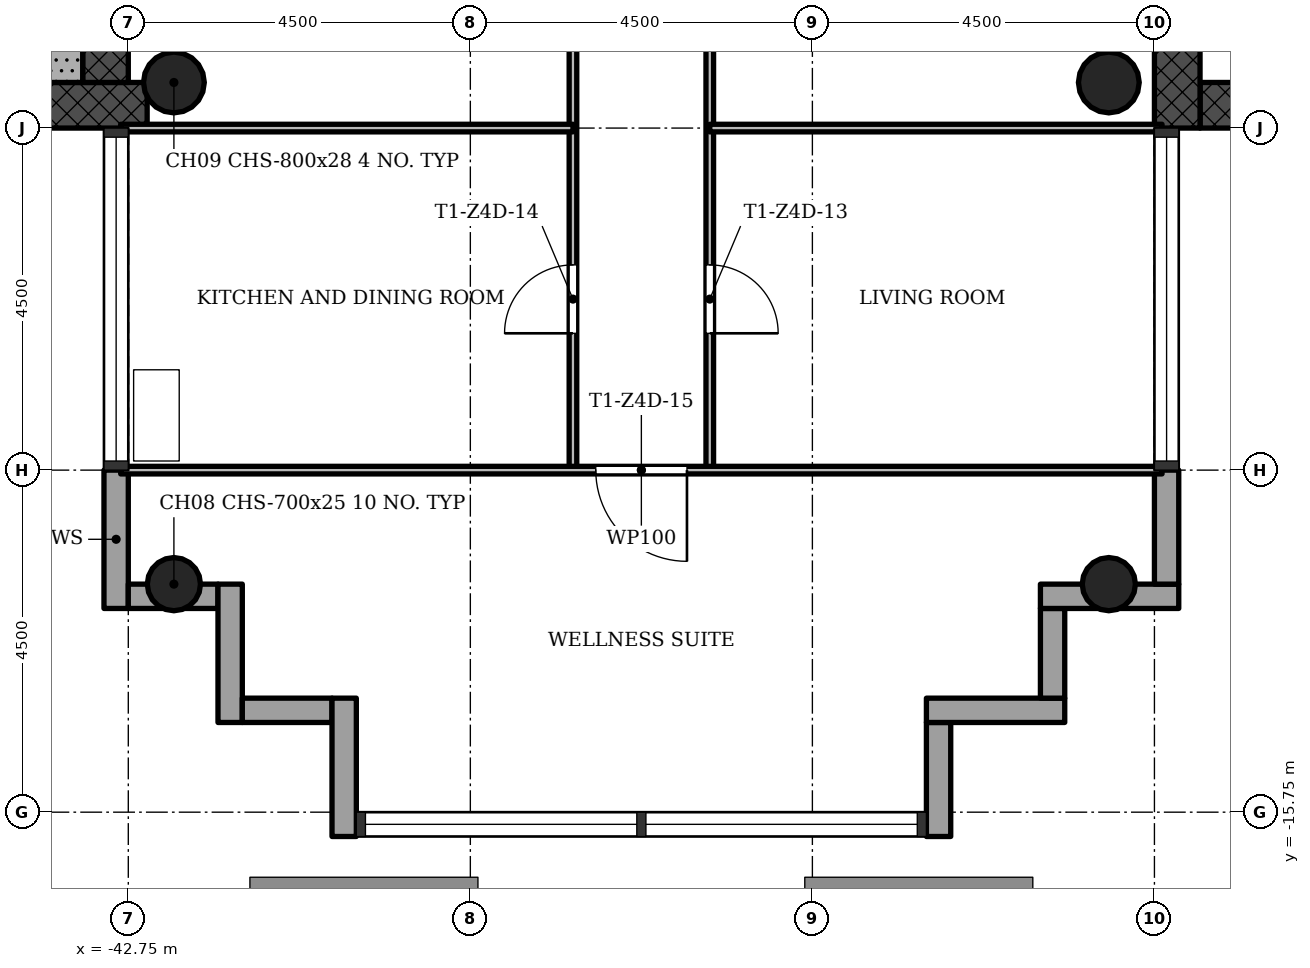
"""IFC4 building model, lengths in metres.
Left out: names, types, materials, properties, quantities, classifications, styles, units other than length and angle.
Written with IfcOpenShell. Run it as: python <this file> out.ifc"""

import sys

from ifc_helpers import new_model, si_unit, direction, frame, frame_2d, origin, origin_2d, place, context, subcontext, project, spatial, rectangle, hollow_circle, extrude, element, fill, save


model = new_model("IFC4")
c1 = context("Model", 3, precision=1e-05, world=origin(), true_north=direction((0.0, 1.0)))
c2 = subcontext(c1, "Body", "Model", "MODEL_VIEW")
j1 = project(units=[si_unit("LENGTHUNIT", "METRE"), si_unit("PLANEANGLEUNIT", "RADIAN")], contexts=[c1])
p1 = place(None, origin())
s1 = spatial("IfcSite", under=j1, at=p1, CompositionType="ELEMENT")
p2 = place(p1, origin())
s2 = spatial("IfcBuilding", under=s1, at=p2, CompositionType="ELEMENT")
p3 = place(p2, frame((0.0, 0.0, 196.0)))
s3 = spatial("IfcBuildingStorey", under=s2, at=p3, CompositionType="ELEMENT", Elevation=196.0)
p4 = place(p3, frame((-28.65, -6.45, 0.0), z_axis=(0.0, 0.0, 1.0), x_axis=(1.0, 0.0, 0.0)))
e1 = element("IfcWall", 1, at=p4, inside=s3, PredefinedType="SHEAR", context=c2, shape_type="SweptSolid", body=[
    extrude(rectangle(XDim=8.4, YDim=0.6, at=frame_2d((4.2, 0.0))), origin(), (0.0, 0.0, 1.0), 3.4),
])
p5 = place(p3, frame((-28.95, 6.15, 0.0), z_axis=(0.0, 0.0, 1.0), x_axis=(0.0, -1.0, 0.0)))
e2 = element("IfcWall", 2, at=p5, inside=s3, PredefinedType="SHEAR", context=c2, shape_type="SweptSolid", body=[
    extrude(rectangle(XDim=12.9, YDim=0.6, at=frame_2d((6.45, 0.0))), origin(), (0.0, 0.0, 1.0), 3.4),
])
p6 = place(p5, frame((5.25, 0.0, 0.0)))
e3 = element("IfcOpeningElement", 3, at=p6, cuts=e2, PredefinedType="OPENING", context=c2, shape_type="SweptSolid", body=[
    extrude(rectangle(XDim=1.8, YDim=2.1, at=frame_2d((0.9, 1.05))), frame((0.0, 0.31, 0.0), z_axis=(0.0, -1.0, 0.0), x_axis=(1.0, 0.0, 0.0)), (0.0, 0.0, 1.0), 0.62),
])
p7 = place(p3, frame((-51.15, -6.45, 0.0), z_axis=(0.0, 0.0, 1.0), x_axis=(1.0, 0.0, 0.0)))
e4 = element("IfcWall", 4, at=p7, inside=s3, PredefinedType="SHEAR", context=c2, shape_type="SweptSolid", body=[
    extrude(rectangle(XDim=8.648, YDim=0.6, at=frame_2d((4.324, 0.0))), origin(), (0.0, 0.0, 1.0), 3.4),
])
p8 = place(p3, frame((-43.05, -6.15, 0.0), z_axis=(0.0, 0.0, 1.0), x_axis=(0.0, 1.0, 0.0)))
e5 = element("IfcWall", 5, at=p8, inside=s3, PredefinedType="SHEAR", context=c2, shape_type="SweptSolid", body=[
    extrude(rectangle(XDim=12.9, YDim=0.6, at=frame_2d((6.45, 0.0))), origin(), (0.0, 0.0, 1.0), 3.4),
])
p9 = place(p8, frame((5.25, 0.0, 0.0)))
e6 = element("IfcOpeningElement", 6, at=p9, cuts=e5, PredefinedType="OPENING", context=c2, shape_type="SweptSolid", body=[
    extrude(rectangle(XDim=1.8, YDim=2.1, at=frame_2d((0.9, 1.05))), frame((0.0, 0.31, 0.0), z_axis=(0.0, -1.0, 0.0), x_axis=(1.0, 0.0, 0.0)), (0.0, 0.0, 1.0), 0.62),
])
for number, where, z_axis, x_axis in (
    (7, (-42.15, -12.75, 0.0), (0.0, 0.0, 1.0), (1.0, 0.0, 0.0)),
    (8, (-29.85, -12.75, 0.0), (0.0, 0.0, 1.0), (1.0, 0.0, 0.0)),
):
    element("IfcColumn", number, at=place(p3, frame(where, z_axis=z_axis, x_axis=x_axis)), inside=s3, PredefinedType="COLUMN", context=c2, shape_type="SweptSolid", body=[
        extrude(hollow_circle(Radius=0.35, WallThickness=0.025, at=origin_2d()), origin(), (0.0, 0.0, 1.0), 3.4),
    ])
for number, where, z_axis, x_axis in (
    (9, (-42.15, -6.15, 0.0), (0.0, 0.0, 1.0), (1.0, 0.0, 0.0)),
    (10, (-29.85, -6.15, 0.0), (0.0, 0.0, 1.0), (1.0, 0.0, 0.0)),
):
    element("IfcColumn", number, at=place(p3, frame(where, z_axis=z_axis, x_axis=x_axis)), inside=s3, PredefinedType="COLUMN", context=c2, shape_type="SweptSolid", body=[
        extrude(hollow_circle(Radius=0.4, WallThickness=0.028, at=origin_2d()), origin(), (0.0, 0.0, 1.0), 3.4),
    ])
p10 = place(p3, frame((-42.91, -11.25, -0.3), z_axis=(0.0, 0.0, 1.0), x_axis=(0.0, -1.0, 0.0)))
e11 = element("IfcWall", 11, at=p10, inside=s3, PredefinedType="STANDARD", context=c2, shape_type="SweptSolid", body=[
    extrude(rectangle(XDim=1.82, YDim=0.32, at=frame_2d((0.91, 0.0))), origin(), (0.0, 0.0, 1.0), 3.4),
])
p11 = place(p3, frame((-42.75, -12.91, -0.3), z_axis=(0.0, 0.0, 1.0), x_axis=(1.0, 0.0, 0.0)))
e12 = element("IfcWall", 12, at=p11, inside=s3, PredefinedType="STANDARD", context=c2, shape_type="SweptSolid", body=[
    extrude(rectangle(XDim=1.18, YDim=0.32, at=frame_2d((0.59, 0.0))), origin(), (0.0, 0.0, 1.0), 3.4),
])
p12 = place(p3, frame((-41.41, -12.75, -0.3), z_axis=(0.0, 0.0, 1.0), x_axis=(0.0, -1.0, 0.0)))
e13 = element("IfcWall", 13, at=p12, inside=s3, PredefinedType="STANDARD", context=c2, shape_type="SweptSolid", body=[
    extrude(rectangle(XDim=1.82, YDim=0.32, at=frame_2d((0.91, 0.0))), origin(), (0.0, 0.0, 1.0), 3.4),
])
p13 = place(p3, frame((-41.25, -14.41, -0.3), z_axis=(0.0, 0.0, 1.0), x_axis=(1.0, 0.0, 0.0)))
e14 = element("IfcWall", 14, at=p13, inside=s3, PredefinedType="STANDARD", context=c2, shape_type="SweptSolid", body=[
    extrude(rectangle(XDim=1.18, YDim=0.32, at=frame_2d((0.59, 0.0))), origin(), (0.0, 0.0, 1.0), 3.4),
])
p14 = place(p3, frame((-39.91, -14.25, -0.3), z_axis=(0.0, 0.0, 1.0), x_axis=(0.0, -1.0, 0.0)))
e15 = element("IfcWall", 15, at=p14, inside=s3, PredefinedType="STANDARD", context=c2, shape_type="SweptSolid", body=[
    extrude(rectangle(XDim=1.82, YDim=0.32, at=frame_2d((0.91, 0.0))), origin(), (0.0, 0.0, 1.0), 3.4),
])
p15 = place(p3, frame((-32.09, -16.07, -0.3), z_axis=(0.0, 0.0, 1.0), x_axis=(0.0, 1.0, 0.0)))
e16 = element("IfcWall", 16, at=p15, inside=s3, PredefinedType="STANDARD", context=c2, shape_type="SweptSolid", body=[
    extrude(rectangle(XDim=1.5, YDim=0.32, at=frame_2d((0.75, 0.0))), origin(), (0.0, 0.0, 1.0), 3.4),
])
p16 = place(p3, frame((-32.25, -14.41, -0.3), z_axis=(0.0, 0.0, 1.0), x_axis=(1.0, 0.0, 0.0)))
e17 = element("IfcWall", 17, at=p16, inside=s3, PredefinedType="STANDARD", context=c2, shape_type="SweptSolid", body=[
    extrude(rectangle(XDim=1.82, YDim=0.32, at=frame_2d((0.91, 0.0))), origin(), (0.0, 0.0, 1.0), 3.4),
])
p17 = place(p3, frame((-30.59, -14.25, -0.3), z_axis=(0.0, 0.0, 1.0), x_axis=(0.0, 1.0, 0.0)))
e18 = element("IfcWall", 18, at=p17, inside=s3, PredefinedType="STANDARD", context=c2, shape_type="SweptSolid", body=[
    extrude(rectangle(XDim=1.18, YDim=0.32, at=frame_2d((0.59, 0.0))), origin(), (0.0, 0.0, 1.0), 3.4),
])
p18 = place(p3, frame((-30.75, -12.91, -0.3), z_axis=(0.0, 0.0, 1.0), x_axis=(1.0, 0.0, 0.0)))
e19 = element("IfcWall", 19, at=p18, inside=s3, PredefinedType="STANDARD", context=c2, shape_type="SweptSolid", body=[
    extrude(rectangle(XDim=1.82, YDim=0.32, at=frame_2d((0.91, 0.0))), origin(), (0.0, 0.0, 1.0), 3.4),
])
p19 = place(p3, frame((-29.09, -12.75, -0.3), z_axis=(0.0, 0.0, 1.0), x_axis=(0.0, 1.0, 0.0)))
e20 = element("IfcWall", 20, at=p19, inside=s3, PredefinedType="STANDARD", context=c2, shape_type="SweptSolid", body=[
    extrude(rectangle(XDim=1.5, YDim=0.32, at=frame_2d((0.75, 0.0))), origin(), (0.0, 0.0, 1.0), 3.4),
])
p20 = place(p3, frame((-36.9, -11.25, 0.0), z_axis=(0.0, 0.0, 1.0), x_axis=(0.0, 1.0, 0.0)))
e21 = element("IfcWall", 21, at=p20, inside=s3, PredefinedType="PARTITIONING", context=c2, shape_type="SweptSolid", body=[
    extrude(rectangle(XDim=6.75, YDim=0.1, at=frame_2d((3.375, 0.0))), origin(), (0.0, 0.0, 1.0), 3.0),
])
p21 = place(p20, frame((1.8, 0.0, 0.0)))
e22 = element("IfcOpeningElement", 22, at=p21, cuts=e21, PredefinedType="OPENING", context=c2, shape_type="SweptSolid", body=[
    extrude(rectangle(XDim=0.9, YDim=2.1, at=frame_2d((0.45, 1.05))), frame((0.0, 0.06, 0.0), z_axis=(0.0, -1.0, 0.0), x_axis=(1.0, 0.0, 0.0)), (0.0, 0.0, 1.0), 0.12),
])
p22 = place(p3, frame((-35.1, -11.25, 0.0), z_axis=(0.0, 0.0, 1.0), x_axis=(0.0, 1.0, 0.0)))
e23 = element("IfcWall", 23, at=p22, inside=s3, PredefinedType="PARTITIONING", context=c2, shape_type="SweptSolid", body=[
    extrude(rectangle(XDim=6.75, YDim=0.1, at=frame_2d((3.375, 0.0))), origin(), (0.0, 0.0, 1.0), 3.0),
])
p23 = place(p22, frame((1.8, 0.0, 0.0)))
e24 = element("IfcOpeningElement", 24, at=p23, cuts=e23, PredefinedType="OPENING", context=c2, shape_type="SweptSolid", body=[
    extrude(rectangle(XDim=0.9, YDim=2.1, at=frame_2d((0.45, 1.05))), frame((0.0, 0.06, 0.0), z_axis=(0.0, -1.0, 0.0), x_axis=(1.0, 0.0, 0.0)), (0.0, 0.0, 1.0), 0.12),
])
p24 = place(p3, frame((-42.85, -11.25, 0.0), z_axis=(0.0, 0.0, 1.0), x_axis=(1.0, 0.0, 0.0)))
e25 = element("IfcWall", 25, at=p24, inside=s3, PredefinedType="PARTITIONING", context=c2, shape_type="SweptSolid", body=[
    extrude(rectangle(XDim=13.7, YDim=0.1, at=frame_2d((6.85, 0.0))), origin(), (0.0, 0.0, 1.0), 3.0),
])
p25 = place(p24, frame((6.25, 0.0, 0.0)))
e26 = element("IfcOpeningElement", 26, at=p25, cuts=e25, PredefinedType="OPENING", context=c2, shape_type="SweptSolid", body=[
    extrude(rectangle(XDim=1.2, YDim=2.1, at=frame_2d((0.6, 1.05))), frame((0.0, 0.06, 0.0), z_axis=(0.0, -1.0, 0.0), x_axis=(1.0, 0.0, 0.0)), (0.0, 0.0, 1.0), 0.12),
])
for number, where, z_axis, x_axis in (
    (27, (-42.85, -6.75, 0.0), (0.0, 0.0, 1.0), (1.0, 0.0, 0.0)),
    (28, (-35.1, -6.75, 0.0), (0.0, 0.0, 1.0), (1.0, 0.0, 0.0)),
):
    element("IfcWall", number, at=place(p3, frame(where, z_axis=z_axis, x_axis=x_axis)), inside=s3, PredefinedType="PARTITIONING", context=c2, shape_type="SweptSolid", body=[
        extrude(rectangle(XDim=5.95, YDim=0.1, at=frame_2d((2.975, 0.0))), origin(), (0.0, 0.0, 1.0), 3.0),
    ])
p26 = place(p3, frame((-43.65, -1.85, 0.0), z_axis=(0.0, 0.0, 1.0), x_axis=(0.0, -1.0, 0.0)))
e29 = element("IfcWall", 29, at=p26, inside=s3, PredefinedType="SHEAR", context=c2, shape_type="SweptSolid", body=[
    extrude(rectangle(XDim=4.3, YDim=0.6, at=frame_2d((2.15, 0.0))), origin(), (0.0, 0.0, 1.0), 3.4),
])
p27 = place(p23, origin())
e30 = element("IfcDoor", 30, at=p27, inside=s3, OperationType="SINGLE_SWING_LEFT", PredefinedType="DOOR", context=c2, shape_type="SweptSolid", body=[
    extrude(rectangle(XDim=0.9, YDim=2.1, at=frame_2d((0.45, 1.05))), frame((0.0, 0.025, 0.0), z_axis=(0.0, -1.0, 0.0), x_axis=(1.0, 0.0, 0.0)), (0.0, 0.0, 1.0), 0.05),
])
fill(e24, e30)
p28 = place(p21, origin())
e31 = element("IfcDoor", 31, at=p28, inside=s3, OperationType="SINGLE_SWING_RIGHT", PredefinedType="DOOR", context=c2, shape_type="SweptSolid", body=[
    extrude(rectangle(XDim=0.9, YDim=2.1, at=frame_2d((0.45, 1.05))), frame((0.0, 0.025, 0.0), z_axis=(0.0, -1.0, 0.0), x_axis=(1.0, 0.0, 0.0)), (0.0, 0.0, 1.0), 0.05),
])
fill(e22, e31)
p29 = place(p25, origin())
e32 = element("IfcDoor", 32, at=p29, inside=s3, OperationType="SINGLE_SWING_RIGHT", PredefinedType="DOOR", context=c2, shape_type="SweptSolid", body=[
    extrude(rectangle(XDim=1.2, YDim=2.1, at=frame_2d((0.6, 1.05))), frame((0.0, 0.025, 0.0), z_axis=(0.0, -1.0, 0.0), x_axis=(1.0, 0.0, 0.0)), (0.0, 0.0, 1.0), 0.05),
])
fill(e26, e32)
save(model, sys.argv[1])
